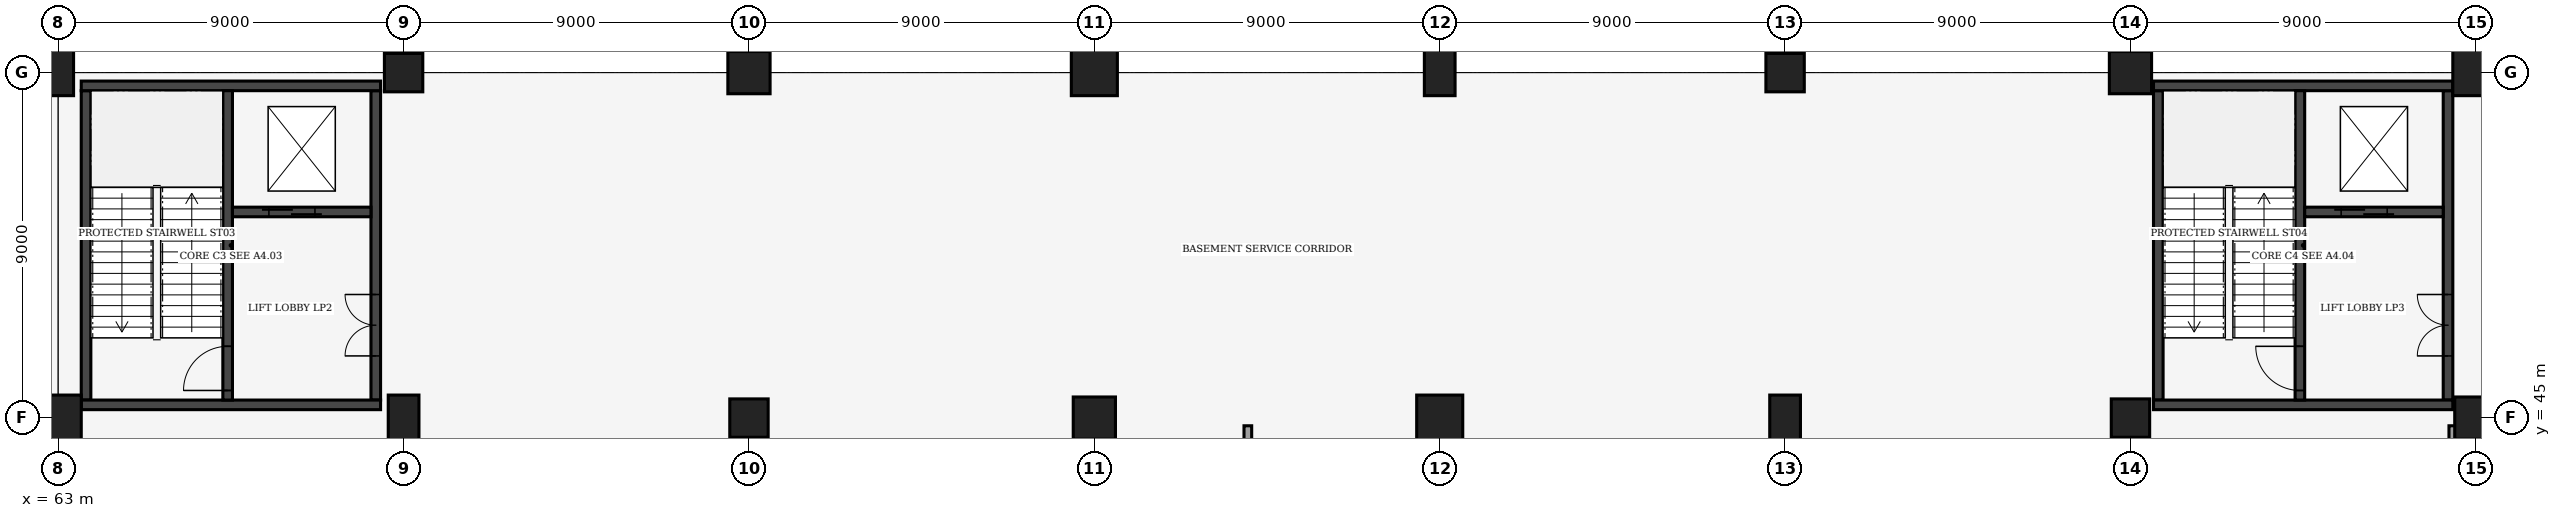
"""IFC4 building model, lengths in metres.
Left out: names, types, materials, properties, quantities, classifications, styles, units other than length and angle.
Written with IfcOpenShell. Run it as: python <this file> out.ifc"""

import sys

from ifc_helpers import new_model, si_unit, direction, frame, frame_2d, origin, origin_2d, place, context, subcontext, project, spatial, rectangle, extrude, element, fill, save


model = new_model("IFC4")
c1 = context("Model", 3, precision=1e-05, world=origin(), true_north=direction((0.0, 1.0)))
c2 = subcontext(c1, "Body", "Model", "MODEL_VIEW")
j1 = project(units=[si_unit("LENGTHUNIT", "METRE"), si_unit("PLANEANGLEUNIT", "RADIAN")], contexts=[c1])
p1 = place(None, origin())
s1 = spatial("IfcSite", under=j1, at=p1, CompositionType="ELEMENT")
p2 = place(p1, origin())
s2 = spatial("IfcBuilding", under=s1, at=p2, CompositionType="ELEMENT")
p3 = place(p2, frame((0.0, 0.0, -5.0)))
s3 = spatial("IfcBuildingStorey", under=s2, at=p3, CompositionType="ELEMENT", Elevation=-5.0)
p4 = place(p3, frame((63.0, 45.0, 0.0), z_axis=(0.0, 0.0, 1.0), x_axis=(1.0, 0.0, 0.0)))
e1 = element("IfcColumn", 1, at=p4, inside=s3, PredefinedType="COLUMN", context=c2, shape_type="SweptSolid", body=[
    extrude(rectangle(XDim=1.2, YDim=1.2, at=origin_2d()), origin(), (0.0, 0.0, 1.0), 5.0),
])
for number, where, z_axis, x_axis in (
    (2, (63.0, 54.0, 0.0), (0.0, 0.0, 1.0), (1.0, 0.0, 0.0)),
    (3, (72.0, 45.0, 0.0), (0.0, 0.0, 1.0), (1.0, 0.0, 0.0)),
):
    element("IfcColumn", number, at=place(p3, frame(where, z_axis=z_axis, x_axis=x_axis)), inside=s3, PredefinedType="COLUMN", context=c2, shape_type="SweptSolid", body=[
        extrude(rectangle(XDim=0.8, YDim=1.2, at=origin_2d()), origin(), (0.0, 0.0, 1.0), 5.0),
    ])
for number, where, z_axis, x_axis in (
    (4, (72.0, 54.0, 0.0), (0.0, 0.0, 1.0), (1.0, 0.0, 0.0)),
    (5, (81.0, 45.0, 0.0), (0.0, 0.0, 1.0), (1.0, 0.0, 0.0)),
):
    element("IfcColumn", number, at=place(p3, frame(where, z_axis=z_axis, x_axis=x_axis)), inside=s3, PredefinedType="COLUMN", context=c2, shape_type="SweptSolid", body=[
        extrude(rectangle(XDim=1.0, YDim=1.0, at=origin_2d()), origin(), (0.0, 0.0, 1.0), 5.0),
    ])
for number, where, z_axis, x_axis in (
    (6, (81.0, 54.0, 0.0), (0.0, 0.0, 1.0), (1.0, 0.0, 0.0)),
    (7, (90.0, 45.0, 0.0), (0.0, 0.0, 1.0), (1.0, 0.0, 0.0)),
):
    element("IfcColumn", number, at=place(p3, frame(where, z_axis=z_axis, x_axis=x_axis)), inside=s3, PredefinedType="COLUMN", context=c2, shape_type="SweptSolid", body=[
        extrude(rectangle(XDim=1.1, YDim=1.1, at=origin_2d()), origin(), (0.0, 0.0, 1.0), 5.0),
    ])
for number, where, z_axis, x_axis in (
    (8, (90.0, 54.0, 0.0), (0.0, 0.0, 1.0), (1.0, 0.0, 0.0)),
    (9, (99.0, 45.0, 0.0), (0.0, 0.0, 1.0), (1.0, 0.0, 0.0)),
):
    element("IfcColumn", number, at=place(p3, frame(where, z_axis=z_axis, x_axis=x_axis)), inside=s3, PredefinedType="COLUMN", context=c2, shape_type="SweptSolid", body=[
        extrude(rectangle(XDim=1.2, YDim=1.2, at=origin_2d()), origin(), (0.0, 0.0, 1.0), 5.0),
    ])
for number, where, z_axis, x_axis in (
    (10, (99.0, 54.0, 0.0), (0.0, 0.0, 1.0), (1.0, 0.0, 0.0)),
    (11, (108.0, 45.0, 0.0), (0.0, 0.0, 1.0), (1.0, 0.0, 0.0)),
):
    element("IfcColumn", number, at=place(p3, frame(where, z_axis=z_axis, x_axis=x_axis)), inside=s3, PredefinedType="COLUMN", context=c2, shape_type="SweptSolid", body=[
        extrude(rectangle(XDim=0.8, YDim=1.2, at=origin_2d()), origin(), (0.0, 0.0, 1.0), 5.0),
    ])
for number, where, z_axis, x_axis in (
    (12, (108.0, 54.0, 0.0), (0.0, 0.0, 1.0), (1.0, 0.0, 0.0)),
    (13, (117.0, 45.0, 0.0), (0.0, 0.0, 1.0), (1.0, 0.0, 0.0)),
):
    element("IfcColumn", number, at=place(p3, frame(where, z_axis=z_axis, x_axis=x_axis)), inside=s3, PredefinedType="COLUMN", context=c2, shape_type="SweptSolid", body=[
        extrude(rectangle(XDim=1.0, YDim=1.0, at=origin_2d()), origin(), (0.0, 0.0, 1.0), 5.0),
    ])
for number, where, z_axis, x_axis in (
    (14, (117.0, 54.0, 0.0), (0.0, 0.0, 1.0), (1.0, 0.0, 0.0)),
    (15, (126.0, 45.0, 0.0), (0.0, 0.0, 1.0), (1.0, 0.0, 0.0)),
):
    element("IfcColumn", number, at=place(p3, frame(where, z_axis=z_axis, x_axis=x_axis)), inside=s3, PredefinedType="COLUMN", context=c2, shape_type="SweptSolid", body=[
        extrude(rectangle(XDim=1.1, YDim=1.1, at=origin_2d()), origin(), (0.0, 0.0, 1.0), 5.0),
    ])
p5 = place(p3, frame((126.0, 54.0, 0.0), z_axis=(0.0, 0.0, 1.0), x_axis=(1.0, 0.0, 0.0)))
e16 = element("IfcColumn", 16, at=p5, inside=s3, PredefinedType="COLUMN", context=c2, shape_type="SweptSolid", body=[
    extrude(rectangle(XDim=1.2, YDim=1.2, at=origin_2d()), origin(), (0.0, 0.0, 1.0), 5.0),
])
p6 = place(p3, frame((63.725, 45.47, 0.0), z_axis=(0.0, 0.0, 1.0), x_axis=(0.0, 1.0, 0.0)))
e17 = element("IfcWall", 17, at=p6, inside=s3, PredefinedType="SHEAR", context=c2, shape_type="SweptSolid", body=[
    extrude(rectangle(XDim=8.06, YDim=0.25, at=frame_2d((4.03, 0.0))), origin(), (0.0, 0.0, 1.0), 4.68),
])
p7 = place(p3, frame((71.275, 45.47, 0.0), z_axis=(0.0, 0.0, 1.0), x_axis=(0.0, 1.0, 0.0)))
e18 = element("IfcWall", 18, at=p7, inside=s3, PredefinedType="SHEAR", context=c2, shape_type="SweptSolid", body=[
    extrude(rectangle(XDim=8.06, YDim=0.25, at=frame_2d((4.03, 0.0))), origin(), (0.0, 0.0, 1.0), 4.68),
])
p8 = place(p7, frame((1.15, 0.0, 0.0)))
e19 = element("IfcOpeningElement", 19, at=p8, cuts=e18, PredefinedType="OPENING", context=c2, shape_type="SweptSolid", body=[
    extrude(rectangle(XDim=1.6, YDim=2.2, at=frame_2d((0.8, 1.1))), frame((0.0, 0.135, 0.0), z_axis=(0.0, -1.0, 0.0), x_axis=(1.0, 0.0, 0.0)), (0.0, 0.0, 1.0), 0.27),
])
for number, where, z_axis, x_axis in (
    (20, (63.6, 45.345, 0.0), (0.0, 0.0, 1.0), (1.0, 0.0, 0.0)),
    (21, (63.6, 53.655, 0.0), (0.0, 0.0, 1.0), (1.0, 0.0, 0.0)),
):
    element("IfcWall", number, at=place(p3, frame(where, z_axis=z_axis, x_axis=x_axis)), inside=s3, PredefinedType="SHEAR", context=c2, shape_type="SweptSolid", body=[
        extrude(rectangle(XDim=7.8, YDim=0.25, at=frame_2d((3.9, 0.0))), origin(), (0.0, 0.0, 1.0), 4.68),
    ])
p9 = place(p3, frame((67.415, 45.47, 0.0), z_axis=(0.0, 0.0, 1.0), x_axis=(0.0, 1.0, 0.0)))
e22 = element("IfcWall", 22, at=p9, inside=s3, PredefinedType="SHEAR", context=c2, shape_type="SweptSolid", body=[
    extrude(rectangle(XDim=8.06, YDim=0.25, at=frame_2d((4.03, 0.0))), origin(), (0.0, 0.0, 1.0), 4.68),
])
p10 = place(p9, frame((0.25, 0.0, 0.0)))
e23 = element("IfcOpeningElement", 23, at=p10, cuts=e22, PredefinedType="OPENING", context=c2, shape_type="SweptSolid", body=[
    extrude(rectangle(XDim=1.15, YDim=2.15, at=frame_2d((0.575, 1.075))), frame((0.0, 0.135, 0.0), z_axis=(0.0, -1.0, 0.0), x_axis=(1.0, 0.0, 0.0)), (0.0, 0.0, 1.0), 0.27),
])
p11 = place(p3, frame((67.54, 50.37, 0.0), z_axis=(0.0, 0.0, 1.0), x_axis=(1.0, 0.0, 0.0)))
e24 = element("IfcWall", 24, at=p11, inside=s3, PredefinedType="SHEAR", context=c2, shape_type="SweptSolid", body=[
    extrude(rectangle(XDim=3.61, YDim=0.25, at=frame_2d((1.805, 0.0))), origin(), (0.0, 0.0, 1.0), 4.68),
])
p12 = place(p11, frame((0.95, 0.0, 0.0)))
e25 = element("IfcOpeningElement", 25, at=p12, cuts=e24, PredefinedType="OPENING", context=c2, shape_type="SweptSolid", body=[
    extrude(rectangle(XDim=1.2, YDim=2.2, at=frame_2d((0.6, 1.1))), frame((0.0, 0.135, 0.0), z_axis=(0.0, -1.0, 0.0), x_axis=(1.0, 0.0, 0.0)), (0.0, 0.0, 1.0), 0.27),
])
p13 = place(p3, frame((117.725, 45.47, 0.0), z_axis=(0.0, 0.0, 1.0), x_axis=(0.0, 1.0, 0.0)))
e26 = element("IfcWall", 26, at=p13, inside=s3, PredefinedType="SHEAR", context=c2, shape_type="SweptSolid", body=[
    extrude(rectangle(XDim=8.06, YDim=0.25, at=frame_2d((4.03, 0.0))), origin(), (0.0, 0.0, 1.0), 4.68),
])
p14 = place(p3, frame((125.275, 45.47, 0.0), z_axis=(0.0, 0.0, 1.0), x_axis=(0.0, 1.0, 0.0)))
e27 = element("IfcWall", 27, at=p14, inside=s3, PredefinedType="SHEAR", context=c2, shape_type="SweptSolid", body=[
    extrude(rectangle(XDim=8.06, YDim=0.25, at=frame_2d((4.03, 0.0))), origin(), (0.0, 0.0, 1.0), 4.68),
])
p15 = place(p14, frame((1.15, 0.0, 0.0)))
e28 = element("IfcOpeningElement", 28, at=p15, cuts=e27, PredefinedType="OPENING", context=c2, shape_type="SweptSolid", body=[
    extrude(rectangle(XDim=1.6, YDim=2.2, at=frame_2d((0.8, 1.1))), frame((0.0, 0.135, 0.0), z_axis=(0.0, -1.0, 0.0), x_axis=(1.0, 0.0, 0.0)), (0.0, 0.0, 1.0), 0.27),
])
for number, where, z_axis, x_axis in (
    (29, (117.6, 45.345, 0.0), (0.0, 0.0, 1.0), (1.0, 0.0, 0.0)),
    (30, (117.6, 53.655, 0.0), (0.0, 0.0, 1.0), (1.0, 0.0, 0.0)),
):
    element("IfcWall", number, at=place(p3, frame(where, z_axis=z_axis, x_axis=x_axis)), inside=s3, PredefinedType="SHEAR", context=c2, shape_type="SweptSolid", body=[
        extrude(rectangle(XDim=7.8, YDim=0.25, at=frame_2d((3.9, 0.0))), origin(), (0.0, 0.0, 1.0), 4.68),
    ])
p16 = place(p3, frame((121.415, 45.47, 0.0), z_axis=(0.0, 0.0, 1.0), x_axis=(0.0, 1.0, 0.0)))
e31 = element("IfcWall", 31, at=p16, inside=s3, PredefinedType="SHEAR", context=c2, shape_type="SweptSolid", body=[
    extrude(rectangle(XDim=8.06, YDim=0.25, at=frame_2d((4.03, 0.0))), origin(), (0.0, 0.0, 1.0), 4.68),
])
p17 = place(p16, frame((0.25, 0.0, 0.0)))
e32 = element("IfcOpeningElement", 32, at=p17, cuts=e31, PredefinedType="OPENING", context=c2, shape_type="SweptSolid", body=[
    extrude(rectangle(XDim=1.15, YDim=2.15, at=frame_2d((0.575, 1.075))), frame((0.0, 0.135, 0.0), z_axis=(0.0, -1.0, 0.0), x_axis=(1.0, 0.0, 0.0)), (0.0, 0.0, 1.0), 0.27),
])
p18 = place(p3, frame((121.54, 50.37, 0.0), z_axis=(0.0, 0.0, 1.0), x_axis=(1.0, 0.0, 0.0)))
e33 = element("IfcWall", 33, at=p18, inside=s3, PredefinedType="SHEAR", context=c2, shape_type="SweptSolid", body=[
    extrude(rectangle(XDim=3.61, YDim=0.25, at=frame_2d((1.805, 0.0))), origin(), (0.0, 0.0, 1.0), 4.68),
])
p19 = place(p18, frame((0.95, 0.0, 0.0)))
e34 = element("IfcOpeningElement", 34, at=p19, cuts=e33, PredefinedType="OPENING", context=c2, shape_type="SweptSolid", body=[
    extrude(rectangle(XDim=1.2, YDim=2.2, at=frame_2d((0.6, 1.1))), frame((0.0, 0.135, 0.0), z_axis=(0.0, -1.0, 0.0), x_axis=(1.0, 0.0, 0.0)), (0.0, 0.0, 1.0), 0.27),
])
p20 = place(p3, frame((94.0, 36.6, 0.0), z_axis=(0.0, 0.0, 1.0), x_axis=(0.0, 1.0, 0.0)))
e35 = element("IfcWall", 35, at=p20, inside=s3, PredefinedType="SOLIDWALL", context=c2, shape_type="SweptSolid", body=[
    extrude(rectangle(XDim=8.2, YDim=0.2, at=frame_2d((4.1, 0.0))), origin(), (0.0, 0.0, 1.0), 3.85),
])
p21 = place(p20, frame((0.25, 0.0, 0.0)))
e36 = element("IfcOpeningElement", 36, at=p21, cuts=e35, PredefinedType="OPENING", context=c2, shape_type="SweptSolid", body=[
    extrude(rectangle(XDim=1.4, YDim=2.25, at=frame_2d((0.7, 1.125))), frame((0.0, 0.11, 0.0), z_axis=(0.0, -1.0, 0.0), x_axis=(1.0, 0.0, 0.0)), (0.0, 0.0, 1.0), 0.22),
])
p22 = place(p3, frame((63.4, 36.72, 0.0), z_axis=(0.0, 0.0, 1.0), x_axis=(0.0, 1.0, 0.0)))
e37 = element("IfcWall", 37, at=p22, inside=s3, PredefinedType="SOLIDWALL", context=c2, shape_type="SweptSolid", body=[
    extrude(rectangle(XDim=7.96, YDim=0.2, at=frame_2d((3.98, 0.0))), origin(), (0.0, 0.0, 1.0), 3.85),
])
p23 = place(p3, frame((125.4, 36.6, 0.0), z_axis=(0.0, 0.0, 1.0), x_axis=(0.0, 1.0, 0.0)))
e38 = element("IfcWall", 38, at=p23, inside=s3, PredefinedType="SOLIDWALL", context=c2, shape_type="SweptSolid", body=[
    extrude(rectangle(XDim=8.2, YDim=0.2, at=frame_2d((4.1, 0.0))), origin(), (0.0, 0.0, 1.0), 3.85),
])
p24 = place(p23, frame((0.85, 0.0, 0.0)))
e39 = element("IfcOpeningElement", 39, at=p24, cuts=e38, PredefinedType="OPENING", context=c2, shape_type="SweptSolid", body=[
    extrude(rectangle(XDim=1.05, YDim=2.15, at=frame_2d((0.525, 1.075))), frame((0.0, 0.11, 0.0), z_axis=(0.0, -1.0, 0.0), x_axis=(1.0, 0.0, 0.0)), (0.0, 0.0, 1.0), 0.22),
])
p25 = place(p10, origin())
e40 = element("IfcDoor", 40, at=p25, inside=s3, OperationType="SINGLE_SWING_LEFT", PredefinedType="DOOR", context=c2, shape_type="SweptSolid", body=[
    extrude(rectangle(XDim=1.15, YDim=2.15, at=frame_2d((0.575, 1.075))), frame((0.0, 0.025, 0.0), z_axis=(0.0, -1.0, 0.0), x_axis=(1.0, 0.0, 0.0)), (0.0, 0.0, 1.0), 0.05),
])
fill(e23, e40)
p26 = place(p12, origin())
e41 = element("IfcDoor", 41, at=p26, inside=s3, OperationType="DOUBLE_DOOR_SLIDING", PredefinedType="DOOR", context=c2, shape_type="SweptSolid", body=[
    extrude(rectangle(XDim=1.2, YDim=2.2, at=frame_2d((0.6, 1.1))), frame((0.0, 0.025, 0.0), z_axis=(0.0, -1.0, 0.0), x_axis=(1.0, 0.0, 0.0)), (0.0, 0.0, 1.0), 0.05),
])
fill(e25, e41)
p27 = place(p8, origin())
e42 = element("IfcDoor", 42, at=p27, inside=s3, OperationType="DOUBLE_DOOR_SINGLE_SWING", PredefinedType="DOOR", context=c2, shape_type="SweptSolid", body=[
    extrude(rectangle(XDim=1.6, YDim=2.2, at=frame_2d((0.8, 1.1))), frame((0.0, 0.025, 0.0), z_axis=(0.0, -1.0, 0.0), x_axis=(1.0, 0.0, 0.0)), (0.0, 0.0, 1.0), 0.05),
])
fill(e19, e42)
p28 = place(p17, origin())
e43 = element("IfcDoor", 43, at=p28, inside=s3, OperationType="SINGLE_SWING_RIGHT", PredefinedType="DOOR", context=c2, shape_type="SweptSolid", body=[
    extrude(rectangle(XDim=1.15, YDim=2.15, at=frame_2d((0.575, 1.075))), frame((0.0, 0.025, 0.0), z_axis=(0.0, -1.0, 0.0), x_axis=(1.0, 0.0, 0.0)), (0.0, 0.0, 1.0), 0.05),
])
fill(e32, e43)
p29 = place(p19, origin())
e44 = element("IfcDoor", 44, at=p29, inside=s3, OperationType="DOUBLE_DOOR_SLIDING", PredefinedType="DOOR", context=c2, shape_type="SweptSolid", body=[
    extrude(rectangle(XDim=1.2, YDim=2.2, at=frame_2d((0.6, 1.1))), frame((0.0, 0.025, 0.0), z_axis=(0.0, -1.0, 0.0), x_axis=(1.0, 0.0, 0.0)), (0.0, 0.0, 1.0), 0.05),
])
fill(e34, e44)
p30 = place(p15, origin())
e45 = element("IfcDoor", 45, at=p30, inside=s3, OperationType="DOUBLE_DOOR_SINGLE_SWING", PredefinedType="DOOR", context=c2, shape_type="SweptSolid", body=[
    extrude(rectangle(XDim=1.6, YDim=2.2, at=frame_2d((0.8, 1.1))), frame((0.0, 0.025, 0.0), z_axis=(0.0, -1.0, 0.0), x_axis=(1.0, 0.0, 0.0)), (0.0, 0.0, 1.0), 0.05),
])
fill(e28, e45)
save(model, sys.argv[1])
